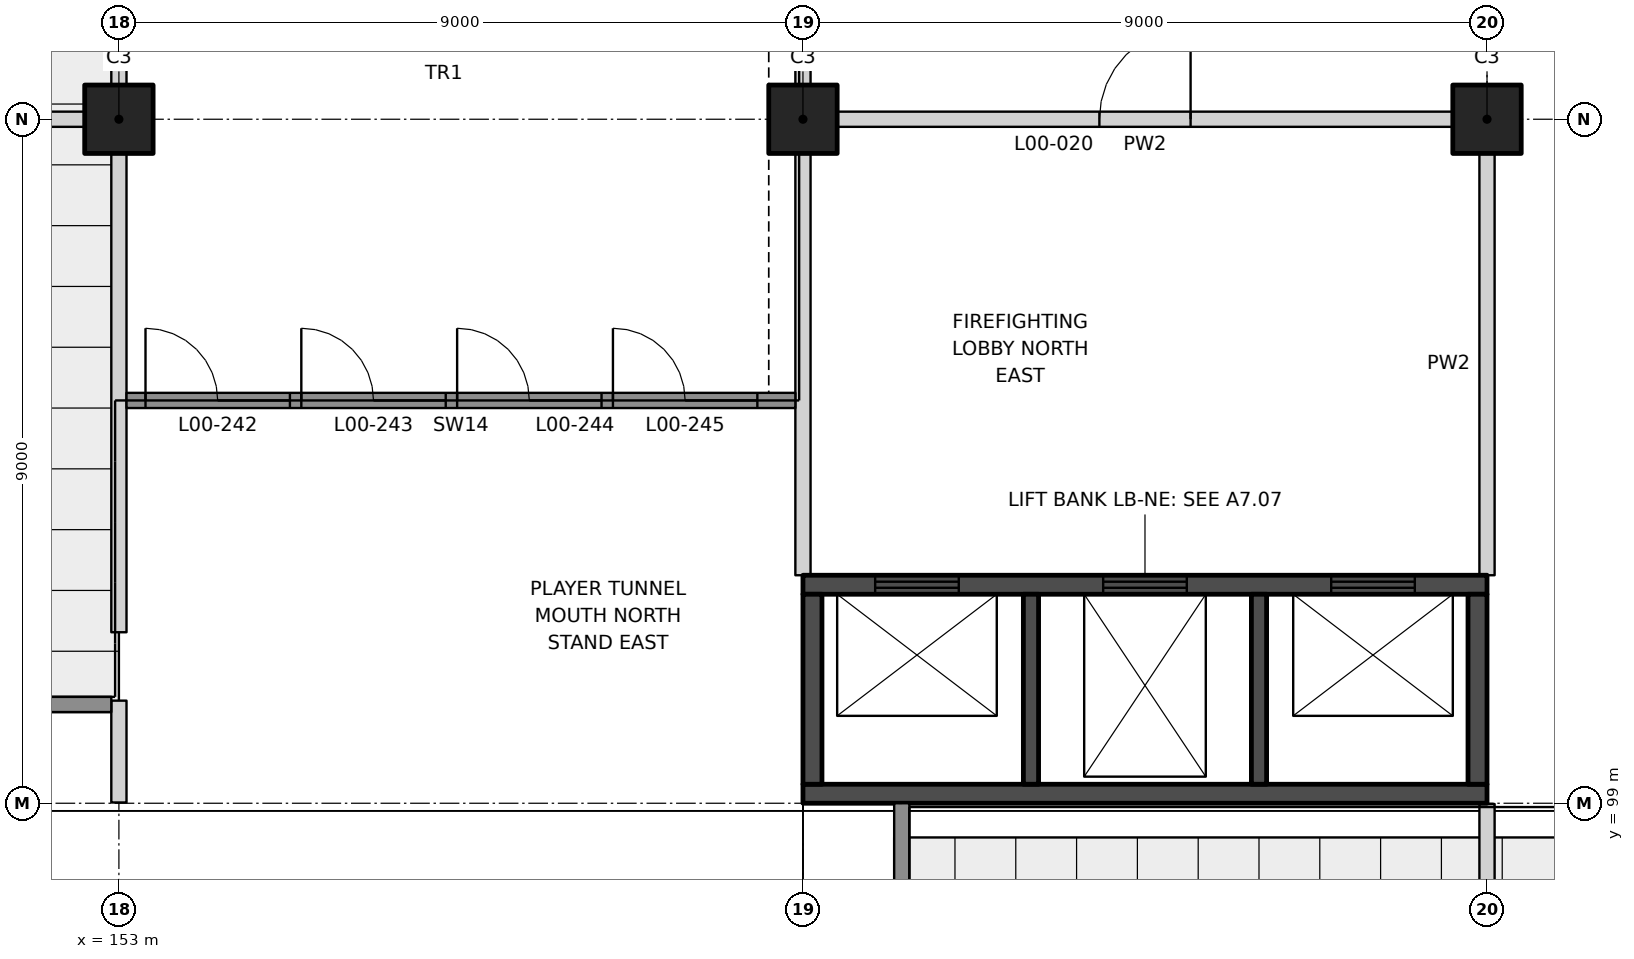
"""IFC4 building model, lengths in metres.
Left out: names, types, materials, properties, quantities, classifications, styles, units other than length and angle.
Written with IfcOpenShell. Run it as: python <this file> out.ifc"""

import sys

from ifc_helpers import new_model, si_unit, direction, frame, frame_2d, origin, origin_2d, place, context, subcontext, project, spatial, polyline, rectangle, outline, extrude, element, fill, save


model = new_model("IFC4")
c1 = context("Model", 3, precision=1e-05, world=origin(), true_north=direction((0.0, 1.0)))
c2 = subcontext(c1, "Body", "Model", "MODEL_VIEW")
j1 = project(units=[si_unit("LENGTHUNIT", "METRE"), si_unit("PLANEANGLEUNIT", "RADIAN")], contexts=[c1])
p1 = place(None, origin())
s1 = spatial("IfcSite", under=j1, at=p1, CompositionType="ELEMENT")
p2 = place(p1, origin())
s2 = spatial("IfcBuilding", under=s1, at=p2, CompositionType="ELEMENT")
p3 = place(p2, origin())
s3 = spatial("IfcBuildingStorey", under=s2, at=p3, CompositionType="ELEMENT", Elevation=0.0)
for number, where, z_axis, x_axis in (
    (1, (162.0, 108.0, 0.0), (0.0, 0.0, 1.0), (1.0, 0.0, 0.0)),
    (2, (171.0, 108.0, 0.0), (0.0, 0.0, 1.0), (1.0, 0.0, 0.0)),
):
    element("IfcColumn", number, at=place(p3, frame(where, z_axis=z_axis, x_axis=x_axis)), inside=s3, PredefinedType="COLUMN", context=c2, shape_type="SweptSolid", body=[
        extrude(rectangle(XDim=0.9, YDim=0.9, at=origin_2d()), origin(), (0.0, 0.0, 1.0), 7.0),
    ])
p4 = place(p3, frame((153.0, 108.0, 0.0), z_axis=(0.0, 0.0, 1.0), x_axis=(1.0, 0.0, 0.0)))
e3 = element("IfcColumn", 3, at=p4, inside=s3, PredefinedType="COLUMN", context=c2, shape_type="SweptSolid", body=[
    extrude(rectangle(XDim=0.9, YDim=0.9, at=origin_2d()), origin(), (0.0, 0.0, 1.0), 3.552),
])
p5 = place(p3, frame((144.45, 108.0, 0.0), z_axis=(0.0, 0.0, 1.0), x_axis=(1.0, 0.0, 0.0)))
e4 = element("IfcWall", 4, at=p5, inside=s3, PredefinedType="PARTITIONING", context=c2, shape_type="SweptSolid", body=[
    extrude(rectangle(XDim=8.1, YDim=0.2, at=frame_2d((4.05, 0.0))), origin(), (0.0, 0.0, 1.0), 4.445),
])
p6 = place(p3, frame((162.45, 108.0, 0.0), z_axis=(0.0, 0.0, 1.0), x_axis=(1.0, 0.0, 0.0)))
e5 = element("IfcWall", 5, at=p6, inside=s3, PredefinedType="PARTITIONING", context=c2, shape_type="SweptSolid", body=[
    extrude(rectangle(XDim=8.1, YDim=0.2, at=frame_2d((4.05, 0.0))), origin(), (0.0, 0.0, 1.0), 5.75),
])
p7 = place(p6, frame((3.45, 0.0, 0.0)))
e6 = element("IfcOpeningElement", 6, at=p7, cuts=e5, PredefinedType="OPENING", context=c2, shape_type="SweptSolid", body=[
    extrude(rectangle(XDim=1.2, YDim=2.1, at=frame_2d((0.6, 1.05))), frame((0.0, 0.11, 0.0), z_axis=(0.0, -1.0, 0.0), x_axis=(1.0, 0.0, 0.0)), (0.0, 0.0, 1.0), 0.22),
])
p8 = place(p3, frame((153.0, 99.01, 0.0), z_axis=(0.0, 0.0, 1.0), x_axis=(0.0, 1.0, 0.0)))
e7 = element("IfcWall", 7, at=p8, inside=s3, PredefinedType="PARTITIONING", context=c2, shape_type="SweptSolid", body=[
    extrude(outline(polyline([(0.0, 0.0), (1.34, 0.0), (1.34, -0.189), (0.893, 7.0), (0.0, 7.0), (0.0, 0.0)])), frame((0.0, 0.1, 0.0), z_axis=(0.0, -1.0, 0.0), x_axis=(1.0, 0.0, 0.0)), (0.0, 0.0, 1.0), 0.2),
])
p9 = place(p3, frame((153.0, 101.25, 0.0), z_axis=(0.0, 0.0, 1.0), x_axis=(0.0, 1.0, 0.0)))
e8 = element("IfcWall", 8, at=p9, inside=s3, PredefinedType="PARTITIONING", context=c2, shape_type="SweptSolid", body=[
    extrude(outline(polyline([(0.0, 0.0), (6.3, 0.0), (6.3, 3.231), (4.362, 2.311), (0.0, 0.239), (0.0, 0.0)])), frame((0.0, 0.1, 0.0), z_axis=(0.0, -1.0, 0.0), x_axis=(1.0, 0.0, 0.0)), (0.0, 0.0, 1.0), 0.2),
])
p10 = place(p3, frame((153.0, 108.45, 0.0), z_axis=(0.0, 0.0, 1.0), x_axis=(0.0, 1.0, 0.0)))
e9 = element("IfcWall", 9, at=p10, inside=s3, PredefinedType="PARTITIONING", context=c2, shape_type="SweptSolid", body=[
    extrude(rectangle(XDim=4.979, YDim=0.2, at=frame_2d((2.49, 0.0))), origin(), (0.0, 0.0, 1.0), 3.439),
])
p11 = place(p10, frame((3.125, 0.0, 0.0)))
e10 = element("IfcOpeningElement", 10, at=p11, cuts=e9, PredefinedType="OPENING", context=c2, shape_type="SweptSolid", body=[
    extrude(rectangle(XDim=1.8, YDim=2.1, at=frame_2d((0.9, 1.05))), frame((0.0, 0.11, 0.0), z_axis=(0.0, -1.0, 0.0), x_axis=(1.0, 0.0, 0.0)), (0.0, 0.0, 1.0), 0.22),
])
p12 = place(p3, frame((162.0, 102.0, 0.0), z_axis=(0.0, 0.0, 1.0), x_axis=(0.0, 1.0, 0.0)))
e11 = element("IfcWall", 11, at=p12, inside=s3, PredefinedType="PARTITIONING", context=c2, shape_type="SweptSolid", body=[
    extrude(rectangle(XDim=5.55, YDim=0.2, at=frame_2d((2.775, 0.0))), origin(), (0.0, 0.0, 1.0), 5.95),
])
p13 = place(p3, frame((162.0, 108.45, 0.0), z_axis=(0.0, 0.0, 1.0), x_axis=(0.0, 1.0, 0.0)))
e12 = element("IfcWall", 12, at=p13, inside=s3, PredefinedType="PARTITIONING", context=c2, shape_type="SweptSolid", body=[
    extrude(rectangle(XDim=4.979, YDim=0.2, at=frame_2d((2.49, 0.0))), origin(), (0.0, 0.0, 1.0), 3.439),
])
p14 = place(p3, frame((171.0, 90.45, 0.0), z_axis=(0.0, 0.0, 1.0), x_axis=(0.0, 1.0, 0.0)))
e13 = element("IfcWall", 13, at=p14, inside=s3, PredefinedType="PARTITIONING", context=c2, shape_type="SweptSolid", body=[
    extrude(rectangle(XDim=8.54, YDim=0.2, at=frame_2d((4.27, 0.0))), origin(), (0.0, 0.0, 1.0), 4.445),
])
p15 = place(p3, frame((171.0, 102.0, 0.0), z_axis=(0.0, 0.0, 1.0), x_axis=(0.0, 1.0, 0.0)))
e14 = element("IfcWall", 14, at=p15, inside=s3, PredefinedType="PARTITIONING", context=c2, shape_type="SweptSolid", body=[
    extrude(rectangle(XDim=5.55, YDim=0.2, at=frame_2d((2.775, 0.0))), origin(), (0.0, 0.0, 1.0), 5.95),
])
p16 = place(p3, frame((162.0, 101.875, 0.0), z_axis=(0.0, 0.0, 1.0), x_axis=(1.0, 0.0, 0.0)))
e15 = element("IfcWall", 15, at=p16, inside=s3, PredefinedType="SHEAR", context=c2, shape_type="SweptSolid", body=[
    extrude(rectangle(XDim=9.0, YDim=0.25, at=frame_2d((4.5, 0.0))), origin(), (0.0, 0.0, 1.0), 7.0),
])
p17 = place(p16, frame((0.95, 0.0, 0.0)))
e16 = element("IfcOpeningElement", 16, at=p17, cuts=e15, PredefinedType="OPENING", context=c2, shape_type="SweptSolid", body=[
    extrude(rectangle(XDim=1.1, YDim=2.1, at=frame_2d((0.55, 1.05))), frame((0.0, 0.135, 0.0), z_axis=(0.0, -1.0, 0.0), x_axis=(1.0, 0.0, 0.0)), (0.0, 0.0, 1.0), 0.27),
])
p18 = place(p16, frame((3.95, 0.0, 0.0)))
e17 = element("IfcOpeningElement", 17, at=p18, cuts=e15, PredefinedType="OPENING", context=c2, shape_type="SweptSolid", body=[
    extrude(rectangle(XDim=1.1, YDim=2.1, at=frame_2d((0.55, 1.05))), frame((0.0, 0.135, 0.0), z_axis=(0.0, -1.0, 0.0), x_axis=(1.0, 0.0, 0.0)), (0.0, 0.0, 1.0), 0.27),
])
p19 = place(p16, frame((6.95, 0.0, 0.0)))
e18 = element("IfcOpeningElement", 18, at=p19, cuts=e15, PredefinedType="OPENING", context=c2, shape_type="SweptSolid", body=[
    extrude(rectangle(XDim=1.1, YDim=2.1, at=frame_2d((0.55, 1.05))), frame((0.0, 0.135, 0.0), z_axis=(0.0, -1.0, 0.0), x_axis=(1.0, 0.0, 0.0)), (0.0, 0.0, 1.0), 0.27),
])
p20 = place(p3, frame((162.0, 99.125, 0.0), z_axis=(0.0, 0.0, 1.0), x_axis=(1.0, 0.0, 0.0)))
e19 = element("IfcWall", 19, at=p20, inside=s3, PredefinedType="SHEAR", context=c2, shape_type="SweptSolid", body=[
    extrude(rectangle(XDim=9.0, YDim=0.25, at=frame_2d((4.5, 0.0))), origin(), (0.0, 0.0, 1.0), 7.0),
])
for number, where, z_axis, x_axis in (
    (20, (162.125, 99.25, 0.0), (0.0, 0.0, 1.0), (0.0, 1.0, 0.0)),
    (21, (170.875, 99.25, 0.0), (0.0, 0.0, 1.0), (0.0, 1.0, 0.0)),
):
    element("IfcWall", number, at=place(p3, frame(where, z_axis=z_axis, x_axis=x_axis)), inside=s3, PredefinedType="SHEAR", context=c2, shape_type="SweptSolid", body=[
        extrude(rectangle(XDim=2.5, YDim=0.25, at=frame_2d((1.25, 0.0))), origin(), (0.0, 0.0, 1.0), 7.0),
    ])
for number, where, z_axis, x_axis in (
    (22, (165.0, 99.25, 0.0), (0.0, 0.0, 1.0), (0.0, 1.0, 0.0)),
    (23, (168.0, 99.25, 0.0), (0.0, 0.0, 1.0), (0.0, 1.0, 0.0)),
):
    element("IfcWall", number, at=place(p3, frame(where, z_axis=z_axis, x_axis=x_axis)), inside=s3, PredefinedType="SHEAR", context=c2, shape_type="SweptSolid", body=[
        extrude(rectangle(XDim=2.5, YDim=0.2, at=frame_2d((1.25, 0.0))), origin(), (0.0, 0.0, 1.0), 7.0),
    ])
p21 = place(p3, frame((153.1, 104.3, 0.0), z_axis=(0.0, 0.0, 1.0), x_axis=(1.0, 0.0, 0.0)))
e24 = element("IfcWall", 24, at=p21, inside=s3, PredefinedType="SOLIDWALL", context=c2, shape_type="SweptSolid", body=[
    extrude(rectangle(XDim=8.8, YDim=0.2, at=frame_2d((4.4, 0.0))), origin(), (0.0, 0.0, 1.0), 2.64),
])
p22 = place(p21, frame((0.25, 0.0, 0.0)))
e25 = element("IfcOpeningElement", 25, at=p22, cuts=e24, PredefinedType="OPENING", context=c2, shape_type="SweptSolid", body=[
    extrude(rectangle(XDim=1.9, YDim=2.1, at=frame_2d((0.95, 1.05))), frame((0.0, 0.11, 0.0), z_axis=(0.0, -1.0, 0.0), x_axis=(1.0, 0.0, 0.0)), (0.0, 0.0, 1.0), 0.22),
])
p23 = place(p21, frame((2.3, 0.0, 0.0)))
e26 = element("IfcOpeningElement", 26, at=p23, cuts=e24, PredefinedType="OPENING", context=c2, shape_type="SweptSolid", body=[
    extrude(rectangle(XDim=1.9, YDim=2.1, at=frame_2d((0.95, 1.05))), frame((0.0, 0.11, 0.0), z_axis=(0.0, -1.0, 0.0), x_axis=(1.0, 0.0, 0.0)), (0.0, 0.0, 1.0), 0.22),
])
p24 = place(p21, frame((4.35, 0.0, 0.0)))
e27 = element("IfcOpeningElement", 27, at=p24, cuts=e24, PredefinedType="OPENING", context=c2, shape_type="SweptSolid", body=[
    extrude(rectangle(XDim=1.9, YDim=2.1, at=frame_2d((0.95, 1.05))), frame((0.0, 0.11, 0.0), z_axis=(0.0, -1.0, 0.0), x_axis=(1.0, 0.0, 0.0)), (0.0, 0.0, 1.0), 0.22),
])
p25 = place(p21, frame((6.4, 0.0, 0.0)))
e28 = element("IfcOpeningElement", 28, at=p25, cuts=e24, PredefinedType="OPENING", context=c2, shape_type="SweptSolid", body=[
    extrude(rectangle(XDim=1.9, YDim=2.1, at=frame_2d((0.95, 1.05))), frame((0.0, 0.11, 0.0), z_axis=(0.0, -1.0, 0.0), x_axis=(1.0, 0.0, 0.0)), (0.0, 0.0, 1.0), 0.22),
])
p26 = place(p3, frame((163.3, 82.5, 0.0), z_axis=(0.0, 0.0, 1.0), x_axis=(0.0, 1.0, 0.0)))
e29 = element("IfcWall", 29, at=p26, inside=s3, PredefinedType="SOLIDWALL", context=c2, shape_type="SweptSolid", body=[
    extrude(rectangle(XDim=16.5, YDim=0.2, at=frame_2d((8.25, 0.0))), origin(), (0.0, 0.0, 1.0), 0.74),
])
p27 = place(p3, frame((145.5, 100.3, 0.0), z_axis=(0.0, 0.0, 1.0), x_axis=(1.0, 0.0, 0.0)))
e30 = element("IfcWall", 30, at=p27, inside=s3, PredefinedType="SOLIDWALL", context=c2, shape_type="SweptSolid", body=[
    extrude(rectangle(XDim=7.4, YDim=0.2, at=frame_2d((3.7, 0.0))), origin(), (0.0, 0.0, 1.0), 0.74),
])
p28 = place(p7, origin())
e31 = element("IfcDoor", 31, at=p28, inside=s3, OperationType="SINGLE_SWING_RIGHT", PredefinedType="DOOR", context=c2, shape_type="SweptSolid", body=[
    extrude(rectangle(XDim=1.2, YDim=2.1, at=frame_2d((0.6, 1.05))), frame((0.0, 0.025, 0.0), z_axis=(0.0, -1.0, 0.0), x_axis=(1.0, 0.0, 0.0)), (0.0, 0.0, 1.0), 0.05),
])
fill(e6, e31)
p29 = place(p17, origin())
e32 = element("IfcDoor", 32, at=p29, inside=s3, OperationType="DOUBLE_DOOR_SLIDING", PredefinedType="DOOR", context=c2, shape_type="SweptSolid", body=[
    extrude(rectangle(XDim=1.1, YDim=2.1, at=frame_2d((0.55, 1.05))), frame((0.0, 0.025, 0.0), z_axis=(0.0, -1.0, 0.0), x_axis=(1.0, 0.0, 0.0)), (0.0, 0.0, 1.0), 0.05),
])
fill(e16, e32)
p30 = place(p18, origin())
e33 = element("IfcDoor", 33, at=p30, inside=s3, OperationType="DOUBLE_DOOR_SLIDING", PredefinedType="DOOR", context=c2, shape_type="SweptSolid", body=[
    extrude(rectangle(XDim=1.1, YDim=2.1, at=frame_2d((0.55, 1.05))), frame((0.0, 0.025, 0.0), z_axis=(0.0, -1.0, 0.0), x_axis=(1.0, 0.0, 0.0)), (0.0, 0.0, 1.0), 0.05),
])
fill(e17, e33)
p31 = place(p19, origin())
e34 = element("IfcDoor", 34, at=p31, inside=s3, OperationType="DOUBLE_DOOR_SLIDING", PredefinedType="DOOR", context=c2, shape_type="SweptSolid", body=[
    extrude(rectangle(XDim=1.1, YDim=2.1, at=frame_2d((0.55, 1.05))), frame((0.0, 0.025, 0.0), z_axis=(0.0, -1.0, 0.0), x_axis=(1.0, 0.0, 0.0)), (0.0, 0.0, 1.0), 0.05),
])
fill(e18, e34)
p32 = place(p22, origin())
e35 = element("IfcDoor", 35, at=p32, inside=s3, OperationType="DOUBLE_DOOR_SINGLE_SWING", PredefinedType="DOOR", context=c2, shape_type="SweptSolid", body=[
    extrude(rectangle(XDim=1.9, YDim=2.1, at=frame_2d((0.95, 1.05))), frame((0.0, 0.025, 0.0), z_axis=(0.0, -1.0, 0.0), x_axis=(1.0, 0.0, 0.0)), (0.0, 0.0, 1.0), 0.05),
])
fill(e25, e35)
p33 = place(p23, origin())
e36 = element("IfcDoor", 36, at=p33, inside=s3, OperationType="DOUBLE_DOOR_SINGLE_SWING", PredefinedType="DOOR", context=c2, shape_type="SweptSolid", body=[
    extrude(rectangle(XDim=1.9, YDim=2.1, at=frame_2d((0.95, 1.05))), frame((0.0, 0.025, 0.0), z_axis=(0.0, -1.0, 0.0), x_axis=(1.0, 0.0, 0.0)), (0.0, 0.0, 1.0), 0.05),
])
fill(e26, e36)
p34 = place(p24, origin())
e37 = element("IfcDoor", 37, at=p34, inside=s3, OperationType="DOUBLE_DOOR_SINGLE_SWING", PredefinedType="DOOR", context=c2, shape_type="SweptSolid", body=[
    extrude(rectangle(XDim=1.9, YDim=2.1, at=frame_2d((0.95, 1.05))), frame((0.0, 0.025, 0.0), z_axis=(0.0, -1.0, 0.0), x_axis=(1.0, 0.0, 0.0)), (0.0, 0.0, 1.0), 0.05),
])
fill(e27, e37)
p35 = place(p25, origin())
e38 = element("IfcDoor", 38, at=p35, inside=s3, OperationType="DOUBLE_DOOR_SINGLE_SWING", PredefinedType="DOOR", context=c2, shape_type="SweptSolid", body=[
    extrude(rectangle(XDim=1.9, YDim=2.1, at=frame_2d((0.95, 1.05))), frame((0.0, 0.025, 0.0), z_axis=(0.0, -1.0, 0.0), x_axis=(1.0, 0.0, 0.0)), (0.0, 0.0, 1.0), 0.05),
])
fill(e28, e38)
save(model, sys.argv[1])
